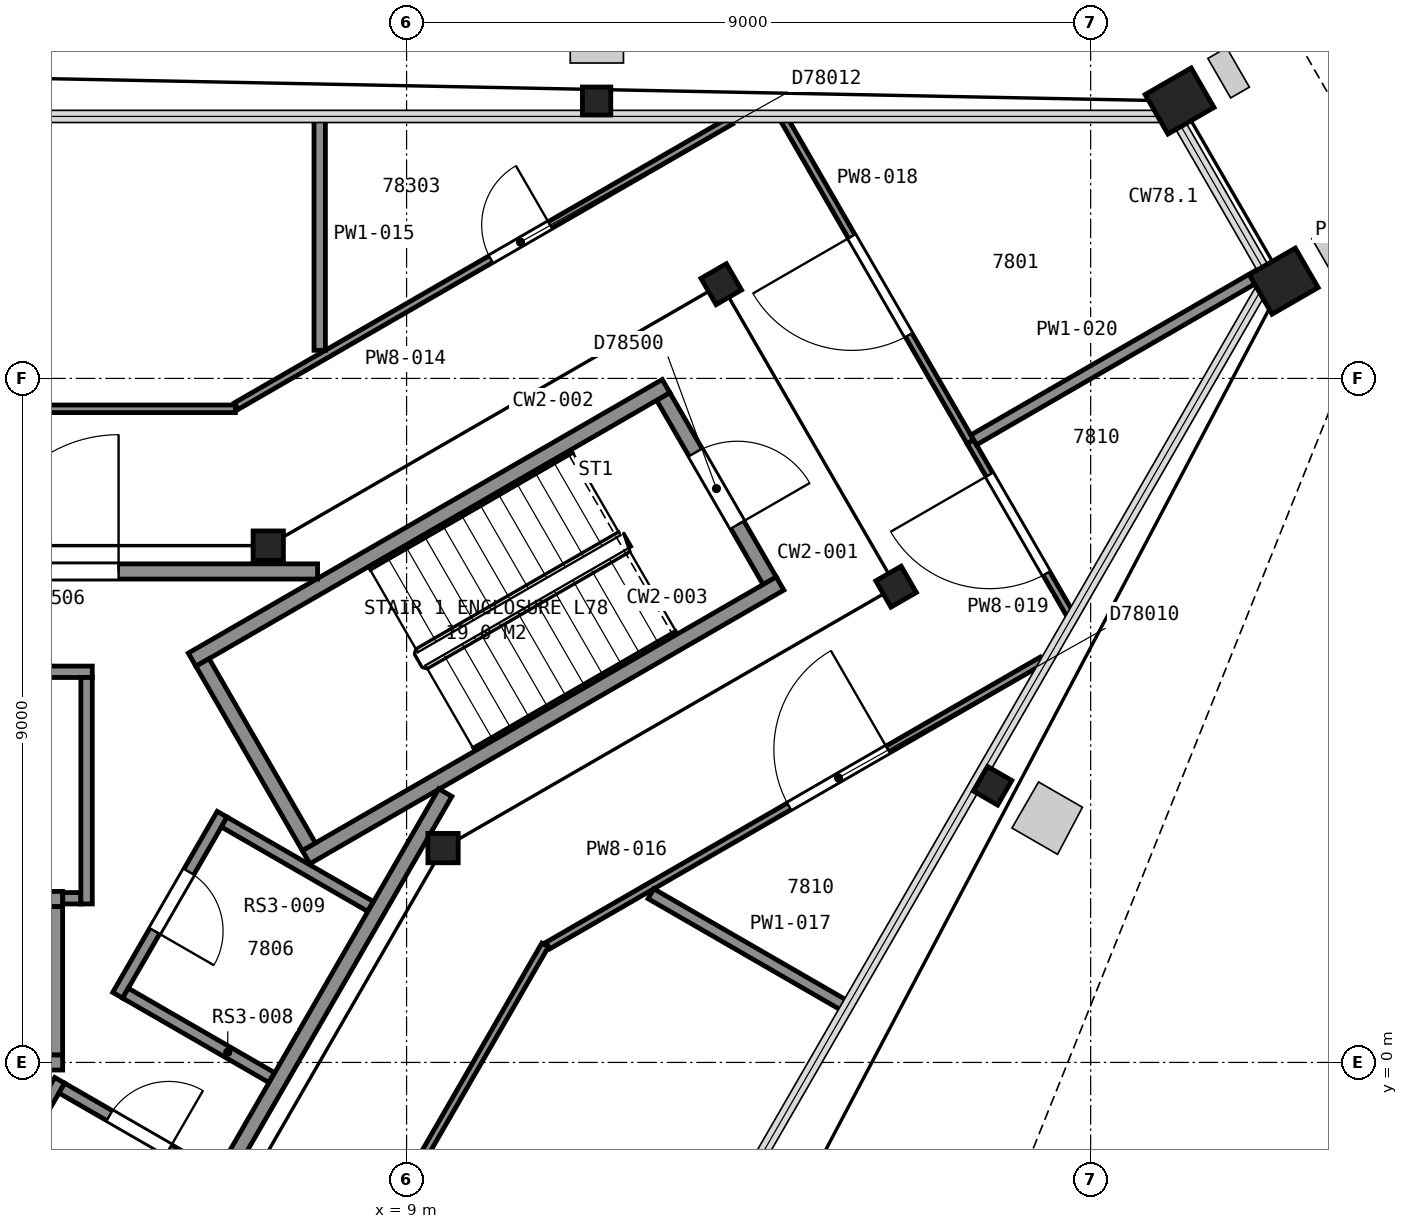
"""IFC4 building model, lengths in metres.
Left out: names, types, materials, properties, quantities, classifications, styles, units other than length and angle.
Written with IfcOpenShell. Run it as: python <this file> out.ifc"""

import sys

from ifc_helpers import new_model, si_unit, direction, frame, frame_2d, origin, origin_2d, place, context, subcontext, project, spatial, rectangle, hollow_rectangle, i_section, extrude, element, fill, save


model = new_model("IFC4")
c1 = context("Model", 3, precision=1e-05, world=origin(), true_north=direction((0.0, 1.0)))
c2 = subcontext(c1, "Body", "Model", "MODEL_VIEW")
j1 = project(units=[si_unit("LENGTHUNIT", "METRE"), si_unit("PLANEANGLEUNIT", "RADIAN")], contexts=[c1])
p1 = place(None, origin())
s1 = spatial("IfcSite", under=j1, at=p1, CompositionType="ELEMENT")
p2 = place(p1, origin())
s2 = spatial("IfcBuilding", under=s1, at=p2, CompositionType="ELEMENT")
p3 = place(p2, frame((0.0, 0.0, 308.4)))
s3 = spatial("IfcBuildingStorey", under=s2, at=p3, CompositionType="ELEMENT", Elevation=308.4)
p4 = place(p3, frame((19.17, 12.65, 0.09), z_axis=(0.0, 0.0, 1.0), x_axis=(0.5, -0.866025403784, 0.0)))
e1 = element("IfcColumn", 1, at=p4, inside=s3, PredefinedType="COLUMN", context=c2, shape_type="SweptSolid", body=[
    extrude(hollow_rectangle(XDim=0.6, YDim=0.7, WallThickness=0.04, at=origin_2d()), origin(), (0.0, 0.0, 1.0), 4.11),
])
for number, where, z_axis, x_axis in (
    (2, (11.5, 12.65, 0.055), (0.0, 0.0, 1.0), (1.0, 0.0, 0.0)),
    (3, (16.71, 3.64, 0.055), (0.0, 0.0, 1.0), (-0.5, -0.866, 0.0)),
):
    element("IfcColumn", number, at=place(p3, frame(where, z_axis=z_axis, x_axis=x_axis)), inside=s3, PredefinedType="COLUMN", context=c2, shape_type="SweptSolid", body=[
        extrude(i_section(OverallWidth=0.373, OverallDepth=0.368, WebThickness=0.015, FlangeThickness=0.024, FilletRadius=0.015, at=origin_2d()), origin(), (0.0, 0.0, 1.0), 4.145),
    ])
p5 = place(p3, frame((20.54, 10.28, 0.09), z_axis=(0.0, 0.0, 1.0), x_axis=(0.5, -0.866025403784, 0.0)))
e4 = element("IfcColumn", 4, at=p5, inside=s3, PredefinedType="COLUMN", context=c2, shape_type="SweptSolid", body=[
    extrude(hollow_rectangle(XDim=0.6, YDim=0.7, WallThickness=0.04, at=origin_2d()), origin(), (0.0, 0.0, 1.0), 4.11),
])
for number, where, z_axis, x_axis in (
    (5, (9.48, 2.82, 0.0), (0.0, 0.0, 1.0), (1.0, 0.0, 0.0)),
    (6, (15.44, 6.26, 0.0), (0.0, 0.0, 1.0), (0.5, -0.866, 0.0)),
    (7, (13.14, 10.24, 0.0), (0.0, 0.0, 1.0), (0.5, -0.866, 0.0)),
    (8, (7.18, 6.8, 0.0), (0.0, 0.0, 1.0), (1.0, 0.0, 0.0)),
):
    element("IfcColumn", number, at=place(p3, frame(where, z_axis=z_axis, x_axis=x_axis)), inside=s3, PredefinedType="COLUMN", context=c2, shape_type="SweptSolid", body=[
        extrude(i_section(OverallWidth=0.399, OverallDepth=0.386, WebThickness=0.021, FlangeThickness=0.033, FilletRadius=0.015, at=origin_2d()), origin(), (0.0, 0.0, 1.0), 4.2),
    ])
p6 = place(p3, frame((13.777, 6.338, 0.0), z_axis=(0.0, 0.0, 1.0), x_axis=(-0.500049511043, 0.865996816683, 0.0)))
e9 = element("IfcWall", 9, at=p6, inside=s3, PredefinedType="PARTITIONING", context=c2, shape_type="SweptSolid", body=[
    extrude(rectangle(XDim=2.8, YDim=0.2, at=frame_2d((1.4, 0.0))), origin(), (0.0, 0.0, 1.0), 3.95),
])
p7 = place(p6, frame((0.85, 0.0, 0.0)))
e10 = element("IfcOpeningElement", 10, at=p7, cuts=e9, PredefinedType="OPENING", context=c2, shape_type="SweptSolid", body=[
    extrude(rectangle(XDim=1.1, YDim=2.1, at=frame_2d((0.55, 1.05))), frame((0.0, 0.11, 0.0), z_axis=(0.0, -1.0, 0.0), x_axis=(1.0, 0.0, 0.0)), (0.0, 0.0, 1.0), 0.22),
])
for number, where, z_axis, x_axis in (
    (11, (6.178, 5.299, 0.0), (0.0, 0.0, 1.0), (0.866, 0.5, 0.0)),
    (12, (7.678, 2.701, 0.0), (0.0, 0.0, 1.0), (0.866, 0.5, 0.0)),
):
    element("IfcWall", number, at=place(p3, frame(where, z_axis=z_axis, x_axis=x_axis)), inside=s3, PredefinedType="PARTITIONING", context=c2, shape_type="SweptSolid", body=[
        extrude(rectangle(XDim=7.2, YDim=0.2, at=frame_2d((3.6, 0.0))), origin(), (0.0, 0.0, 1.0), 3.95),
    ])
p8 = place(p3, frame((7.715, 2.838, 0.0), z_axis=(0.0, 0.0, 1.0), x_axis=(-0.500049511043, 0.865996816683, 0.0)))
e13 = element("IfcWall", 13, at=p8, inside=s3, PredefinedType="PARTITIONING", context=c2, shape_type="SweptSolid", body=[
    extrude(rectangle(XDim=2.8, YDim=0.2, at=frame_2d((1.4, 0.0))), origin(), (0.0, 0.0, 1.0), 3.95),
])
p9 = place(p3, frame((1.525, 0.0, 0.0), z_axis=(0.0, 0.0, 1.0), x_axis=(1.0, 0.0, 0.0)))
e14 = element("IfcWall", 14, at=p9, inside=s3, PredefinedType="PARTITIONING", context=c2, shape_type="SweptSolid", body=[
    extrude(rectangle(XDim=2.95, YDim=0.2, at=frame_2d((1.475, 0.0))), origin(), (0.0, 0.0, 1.0), 4.2),
])
p10 = place(p3, frame((1.525, 2.15, 0.0), z_axis=(0.0, 0.0, 1.0), x_axis=(1.0, 0.0, 0.0)))
e15 = element("IfcWall", 15, at=p10, inside=s3, PredefinedType="PARTITIONING", context=c2, shape_type="SweptSolid", body=[
    extrude(rectangle(XDim=2.95, YDim=0.2, at=frame_2d((1.475, 0.0))), origin(), (0.0, 0.0, 1.0), 4.2),
])
p11 = place(p10, frame((0.925, 0.0, 0.0)))
e16 = element("IfcOpeningElement", 16, at=p11, cuts=e15, PredefinedType="OPENING", context=c2, shape_type="SweptSolid", body=[
    extrude(rectangle(XDim=1.1, YDim=2.1, at=frame_2d((0.55, 1.05))), frame((0.0, 0.11, 0.0), z_axis=(0.0, -1.0, 0.0), x_axis=(1.0, 0.0, 0.0)), (0.0, 0.0, 1.0), 0.22),
])
p12 = place(p3, frame((4.375, 0.1, 0.0), z_axis=(0.0, 0.0, 1.0), x_axis=(0.0, 1.0, 0.0)))
e17 = element("IfcWall", 17, at=p12, inside=s3, PredefinedType="PARTITIONING", context=c2, shape_type="SweptSolid", body=[
    extrude(rectangle(XDim=1.95, YDim=0.2, at=frame_2d((0.975, 0.0))), origin(), (0.0, 0.0, 1.0), 4.2),
])
p13 = place(p3, frame((7.829, 6.46, 0.0), z_axis=(0.0, 0.0, 1.0), x_axis=(-1.0, 0.0, 0.0)))
e18 = element("IfcWall", 18, at=p13, inside=s3, PredefinedType="PARTITIONING", context=c2, shape_type="SweptSolid", body=[
    extrude(rectangle(XDim=15.658, YDim=0.2, at=frame_2d((7.829, 0.0))), origin(), (0.0, 0.0, 1.0), 3.95),
])
p14 = place(p13, frame((2.618, 0.0, 0.0)))
e19 = element("IfcOpeningElement", 19, at=p14, cuts=e18, PredefinedType="OPENING", context=c2, shape_type="SweptSolid", body=[
    extrude(rectangle(XDim=1.8, YDim=2.1, at=frame_2d((0.9, 1.05))), frame((0.0, 0.11, 0.0), z_axis=(0.0, -1.0, 0.0), x_axis=(1.0, 0.0, 0.0)), (0.0, 0.0, 1.0), 0.22),
])
p15 = place(p3, frame((-0.245, 5.14, 0.0), z_axis=(0.0, 0.0, 1.0), x_axis=(1.0, 0.0, 0.0)))
e20 = element("IfcWall", 20, at=p15, inside=s3, PredefinedType="PARTITIONING", context=c2, shape_type="SweptSolid", body=[
    extrude(rectangle(XDim=5.11, YDim=0.15, at=frame_2d((2.555, 0.0))), origin(), (0.0, 0.0, 1.0), 3.95),
])
p16 = place(p15, frame((1.975, 0.0, 0.0)))
e21 = element("IfcOpeningElement", 21, at=p16, cuts=e20, PredefinedType="OPENING", context=c2, shape_type="SweptSolid", body=[
    extrude(rectangle(XDim=1.0, YDim=2.1, at=frame_2d((0.5, 1.05))), frame((0.0, 0.085, 0.0), z_axis=(0.0, -1.0, 0.0), x_axis=(1.0, 0.0, 0.0)), (0.0, 0.0, 1.0), 0.17),
])
p17 = place(p3, frame((2.161, -4.175, 0.0), z_axis=(0.0, 0.0, 1.0), x_axis=(0.500069275991, 0.865985403578, 0.0)))
e22 = element("IfcWall", 22, at=p17, inside=s3, PredefinedType="PARTITIONING", context=c2, shape_type="SweptSolid", body=[
    extrude(rectangle(XDim=4.55, YDim=0.15, at=frame_2d((2.275, 0.0))), origin(), (0.0, 0.0, 1.0), 3.95),
])
p18 = place(p3, frame((3.828, -6.29, 0.0), z_axis=(0.0, 0.0, 1.0), x_axis=(0.499979739078, 0.866037101117, 0.0)))
e23 = element("IfcWall", 23, at=p18, inside=s3, PredefinedType="PARTITIONING", context=c2, shape_type="SweptSolid", body=[
    extrude(rectangle(XDim=11.363, YDim=0.2, at=frame_2d((5.681, 0.0))), origin(), (0.0, 0.0, 1.0), 3.95),
])
p19 = place(p3, frame((6.474, -1.498, 0.0), z_axis=(0.0, 0.0, 1.0), x_axis=(-0.866112027296, 0.499849933654, 0.0)))
e24 = element("IfcWall", 24, at=p19, inside=s3, PredefinedType="PARTITIONING", context=c2, shape_type="SweptSolid", body=[
    extrude(rectangle(XDim=2.321, YDim=0.15, at=frame_2d((1.161, 0.0))), origin(), (0.0, 0.0, 1.0), 3.95),
])
p20 = place(p19, frame((0.696, 0.0, 0.0)))
e25 = element("IfcOpeningElement", 25, at=p20, cuts=e24, PredefinedType="OPENING", context=c2, shape_type="SweptSolid", body=[
    extrude(rectangle(XDim=0.9, YDim=2.1, at=frame_2d((0.45, 1.05))), frame((0.0, 0.085, 0.0), z_axis=(0.0, -1.0, 0.0), x_axis=(1.0, 0.0, 0.0)), (0.0, 0.0, 1.0), 0.17),
])
p21 = place(p3, frame((4.477, 2.16, 0.0), z_axis=(0.0, 0.0, 1.0), x_axis=(1.0, 0.0, 0.0)))
e26 = element("IfcWall", 26, at=p21, inside=s3, PredefinedType="PARTITIONING", context=c2, shape_type="SweptSolid", body=[
    extrude(rectangle(XDim=0.238, YDim=0.15, at=frame_2d((0.119, 0.0))), origin(), (0.0, 0.0, 1.0), 3.95),
])
p22 = place(p3, frame((4.79, 2.085, 0.0), z_axis=(0.0, 0.0, 1.0), x_axis=(0.0, 1.0, 0.0)))
e27 = element("IfcWall", 27, at=p22, inside=s3, PredefinedType="PARTITIONING", context=c2, shape_type="SweptSolid", body=[
    extrude(rectangle(XDim=2.98, YDim=0.15, at=frame_2d((1.49, 0.0))), origin(), (0.0, 0.0, 1.0), 3.95),
])
p23 = place(p3, frame((6.573, 3.266, 0.0), z_axis=(0.0, 0.0, 1.0), x_axis=(-0.499958106649, -0.866049589571, 0.0)))
e28 = element("IfcWall", 28, at=p23, inside=s3, PredefinedType="PARTITIONING", context=c2, shape_type="SweptSolid", body=[
    extrude(rectangle(XDim=2.75, YDim=0.15, at=frame_2d((1.375, 0.0))), origin(), (0.0, 0.0, 1.0), 3.95),
])
p24 = place(p23, frame((0.875, 0.0, 0.0)))
e29 = element("IfcOpeningElement", 29, at=p24, cuts=e28, PredefinedType="OPENING", context=c2, shape_type="SweptSolid", body=[
    extrude(rectangle(XDim=0.9, YDim=2.1, at=frame_2d((0.45, 1.05))), frame((0.0, 0.085, 0.0), z_axis=(0.0, -1.0, 0.0), x_axis=(1.0, 0.0, 0.0)), (0.0, 0.0, 1.0), 0.17),
])
for number, where, z_axis, x_axis in (
    (30, (5.301, 0.912, 0.0), (0.0, 0.0, 1.0), (0.866, -0.5, 0.0)),
    (31, (6.601, 3.164, 0.0), (0.0, 0.0, 1.0), (0.866, -0.5, 0.0)),
):
    element("IfcWall", number, at=place(p3, frame(where, z_axis=z_axis, x_axis=x_axis)), inside=s3, PredefinedType="PARTITIONING", context=c2, shape_type="SweptSolid", body=[
        extrude(rectangle(XDim=2.22, YDim=0.15, at=frame_2d((1.11, 0.0))), origin(), (0.0, 0.0, 1.0), 3.95),
    ])
p25 = place(p3, frame((-6.748, 8.6, 0.0), z_axis=(0.0, 0.0, 1.0), x_axis=(1.0, 0.0, 0.0)))
e32 = element("IfcWall", 32, at=p25, inside=s3, PredefinedType="PARTITIONING", context=c2, shape_type="SweptSolid", body=[
    extrude(rectangle(XDim=13.496, YDim=0.1, at=frame_2d((6.748, 0.0))), origin(), (0.0, 0.0, 1.0), 3.297),
])
p26 = place(p25, frame((6.563, 0.0, 0.0)))
e33 = element("IfcOpeningElement", 33, at=p26, cuts=e32, PredefinedType="OPENING", context=c2, shape_type="SweptSolid", body=[
    extrude(rectangle(XDim=1.5, YDim=2.1, at=frame_2d((0.75, 1.05))), frame((0.0, 0.06, 0.0), z_axis=(0.0, -1.0, 0.0), x_axis=(1.0, 0.0, 0.0)), (0.0, 0.0, 1.0), 0.12),
])
p27 = place(p3, frame((10.823, 1.545, 0.0), z_axis=(0.0, 0.0, 1.0), x_axis=(-0.499912942625, -0.866075660549, 0.0)))
e34 = element("IfcWall", 34, at=p27, inside=s3, PredefinedType="PARTITIONING", context=c2, shape_type="SweptSolid", body=[
    extrude(rectangle(XDim=13.499, YDim=0.1, at=frame_2d((6.749, 0.0))), origin(), (0.0, 0.0, 1.0), 3.297),
])
p28 = place(p27, frame((4.119, 0.0, 0.0)))
e35 = element("IfcOpeningElement", 35, at=p28, cuts=e34, PredefinedType="OPENING", context=c2, shape_type="SweptSolid", body=[
    extrude(rectangle(XDim=1.5, YDim=2.1, at=frame_2d((0.75, 1.05))), frame((0.0, 0.06, 0.0), z_axis=(0.0, -1.0, 0.0), x_axis=(1.0, 0.0, 0.0)), (0.0, 0.0, 1.0), 0.12),
])
p29 = place(p3, frame((6.759, 8.635, 0.0), z_axis=(0.0, 0.0, 1.0), x_axis=(0.866073029218, 0.499917501255, 0.0)))
e36 = element("IfcWall", 36, at=p29, inside=s3, PredefinedType="PARTITIONING", context=c2, shape_type="SweptSolid", body=[
    extrude(rectangle(XDim=7.512, YDim=0.1, at=frame_2d((3.756, 0.0))), origin(), (0.0, 0.0, 1.0), 3.297),
])
p30 = place(p29, frame((3.868, 0.0, 0.0)))
e37 = element("IfcOpeningElement", 37, at=p30, cuts=e36, PredefinedType="OPENING", context=c2, shape_type="SweptSolid", body=[
    extrude(rectangle(XDim=0.9, YDim=2.1, at=frame_2d((0.45, 1.05))), frame((0.0, 0.06, 0.0), z_axis=(0.0, -1.0, 0.0), x_axis=(1.0, 0.0, 0.0)), (0.0, 0.0, 1.0), 0.12),
])
p31 = place(p3, frame((7.857, 9.37, 0.0), z_axis=(0.0, 0.0, 1.0), x_axis=(0.0, 1.0, 0.0)))
e38 = element("IfcWall", 38, at=p31, inside=s3, PredefinedType="PARTITIONING", context=c2, shape_type="SweptSolid", body=[
    extrude(rectangle(XDim=3.063, YDim=0.15, at=frame_2d((1.531, 0.0))), origin(), (0.0, 0.0, 1.0), 3.297),
])
p32 = place(p3, frame((17.361, 5.29, 0.0), z_axis=(0.0, 0.0, 1.0), x_axis=(-0.866105995393, -0.499860385252, 0.0)))
e39 = element("IfcWall", 39, at=p32, inside=s3, PredefinedType="PARTITIONING", context=c2, shape_type="SweptSolid", body=[
    extrude(rectangle(XDim=7.508, YDim=0.1, at=frame_2d((3.754, 0.0))), origin(), (0.0, 0.0, 1.0), 3.297),
])
p33 = place(p32, frame((2.343, 0.0, 0.0)))
e40 = element("IfcOpeningElement", 40, at=p33, cuts=e39, PredefinedType="OPENING", context=c2, shape_type="SweptSolid", body=[
    extrude(rectangle(XDim=1.5, YDim=2.1, at=frame_2d((0.75, 1.05))), frame((0.0, 0.06, 0.0), z_axis=(0.0, -1.0, 0.0), x_axis=(1.0, 0.0, 0.0)), (0.0, 0.0, 1.0), 0.12),
])
p34 = place(p3, frame((12.215, 2.219, 0.0), z_axis=(0.0, 0.0, 1.0), x_axis=(0.865983964866, -0.500071767444, 0.0)))
e41 = element("IfcWall", 41, at=p34, inside=s3, PredefinedType="PARTITIONING", context=c2, shape_type="SweptSolid", body=[
    extrude(rectangle(XDim=2.964, YDim=0.15, at=frame_2d((1.482, 0.0))), origin(), (0.0, 0.0, 1.0), 3.297),
])
p35 = place(p3, frame((13.966, 12.408, 0.0), z_axis=(0.0, 0.0, 1.0), x_axis=(0.500399645014, -0.865794545646, 0.0)))
e42 = element("IfcWall", 42, at=p35, inside=s3, PredefinedType="PARTITIONING", context=c2, shape_type="SweptSolid", body=[
    extrude(rectangle(XDim=4.899, YDim=0.1, at=frame_2d((2.449, 0.0))), origin(), (0.0, 0.0, 1.0), 3.297),
])
p36 = place(p35, frame((1.779, 0.0, 0.0)))
e43 = element("IfcOpeningElement", 43, at=p36, cuts=e42, PredefinedType="OPENING", context=c2, shape_type="SweptSolid", body=[
    extrude(rectangle(XDim=1.5, YDim=2.1, at=frame_2d((0.75, 1.05))), frame((0.0, 0.06, 0.0), z_axis=(0.0, -1.0, 0.0), x_axis=(1.0, 0.0, 0.0)), (0.0, 0.0, 1.0), 0.12),
])
p37 = place(p3, frame((16.418, 8.166, 0.0), z_axis=(0.0, 0.0, 1.0), x_axis=(0.500141194934, -0.865943869503, 0.0)))
e44 = element("IfcWall", 44, at=p37, inside=s3, PredefinedType="PARTITIONING", context=c2, shape_type="SweptSolid", body=[
    extrude(rectangle(XDim=2.624, YDim=0.1, at=frame_2d((1.312, 0.0))), origin(), (0.0, 0.0, 1.0), 3.297),
])
p38 = place(p37, frame((0.5, 0.0, 0.0)))
e45 = element("IfcOpeningElement", 45, at=p38, cuts=e44, PredefinedType="OPENING", context=c2, shape_type="SweptSolid", body=[
    extrude(rectangle(XDim=1.5, YDim=2.1, at=frame_2d((0.75, 1.05))), frame((0.0, 0.06, 0.0), z_axis=(0.0, -1.0, 0.0), x_axis=(1.0, 0.0, 0.0)), (0.0, 0.0, 1.0), 0.12),
])
p39 = place(p3, frame((16.461, 8.191, 0.0), z_axis=(0.0, 0.0, 1.0), x_axis=(0.865849090599, 0.500305259125, 0.0)))
e46 = element("IfcWall", 46, at=p39, inside=s3, PredefinedType="PARTITIONING", context=c2, shape_type="SweptSolid", body=[
    extrude(rectangle(XDim=4.411, YDim=0.15, at=frame_2d((2.206, 0.0))), origin(), (0.0, 0.0, 1.0), 3.297),
])
p40 = place(p7, origin())
e47 = element("IfcDoor", 47, at=p40, inside=s3, OperationType="SINGLE_SWING_LEFT", PredefinedType="DOOR", context=c2, shape_type="SweptSolid", body=[
    extrude(rectangle(XDim=1.1, YDim=2.1, at=frame_2d((0.55, 1.05))), frame((0.0, 0.025, 0.0), z_axis=(0.0, -1.0, 0.0), x_axis=(1.0, 0.0, 0.0)), (0.0, 0.0, 1.0), 0.05),
])
fill(e10, e47)
p41 = place(p14, origin())
e48 = element("IfcDoor", 48, at=p41, inside=s3, OperationType="DOUBLE_DOOR_SINGLE_SWING", PredefinedType="DOOR", context=c2, shape_type="SweptSolid", body=[
    extrude(rectangle(XDim=1.8, YDim=2.1, at=frame_2d((0.9, 1.05))), frame((0.0, 0.025, 0.0), z_axis=(0.0, -1.0, 0.0), x_axis=(1.0, 0.0, 0.0)), (0.0, 0.0, 1.0), 0.05),
])
fill(e19, e48)
p42 = place(p20, origin())
e49 = element("IfcDoor", 49, at=p42, inside=s3, OperationType="SINGLE_SWING_LEFT", PredefinedType="DOOR", context=c2, shape_type="SweptSolid", body=[
    extrude(rectangle(XDim=0.9, YDim=2.1, at=frame_2d((0.45, 1.05))), frame((0.0, 0.025, 0.0), z_axis=(0.0, -1.0, 0.0), x_axis=(1.0, 0.0, 0.0)), (0.0, 0.0, 1.0), 0.05),
])
fill(e25, e49)
p43 = place(p24, origin())
e50 = element("IfcDoor", 50, at=p43, inside=s3, OperationType="SINGLE_SWING_RIGHT", PredefinedType="DOOR", context=c2, shape_type="SweptSolid", body=[
    extrude(rectangle(XDim=0.9, YDim=2.1, at=frame_2d((0.45, 1.05))), frame((0.0, 0.025, 0.0), z_axis=(0.0, -1.0, 0.0), x_axis=(1.0, 0.0, 0.0)), (0.0, 0.0, 1.0), 0.05),
])
fill(e29, e50)
p44 = place(p30, origin())
e51 = element("IfcDoor", 51, at=p44, inside=s3, OperationType="SINGLE_SWING_RIGHT", PredefinedType="DOOR", context=c2, shape_type="SweptSolid", body=[
    extrude(rectangle(XDim=0.9, YDim=2.1, at=frame_2d((0.45, 1.05))), frame((0.0, 0.025, 0.0), z_axis=(0.0, -1.0, 0.0), x_axis=(1.0, 0.0, 0.0)), (0.0, 0.0, 1.0), 0.05),
])
fill(e37, e51)
p45 = place(p33, origin())
e52 = element("IfcDoor", 52, at=p45, inside=s3, OperationType="DOUBLE_DOOR_SINGLE_SWING", PredefinedType="DOOR", context=c2, shape_type="SweptSolid", body=[
    extrude(rectangle(XDim=1.5, YDim=2.1, at=frame_2d((0.75, 1.05))), frame((0.0, 0.025, 0.0), z_axis=(0.0, -1.0, 0.0), x_axis=(1.0, 0.0, 0.0)), (0.0, 0.0, 1.0), 0.05),
])
fill(e40, e52)
p46 = place(p36, origin())
e53 = element("IfcDoor", 53, at=p46, inside=s3, OperationType="DOUBLE_DOOR_SINGLE_SWING", PredefinedType="DOOR", context=c2, shape_type="SweptSolid", body=[
    extrude(rectangle(XDim=1.5, YDim=2.1, at=frame_2d((0.75, 1.05))), frame((0.0, 0.025, 0.0), z_axis=(0.0, -1.0, 0.0), x_axis=(1.0, 0.0, 0.0)), (0.0, 0.0, 1.0), 0.05),
])
fill(e43, e53)
p47 = place(p38, origin())
e54 = element("IfcDoor", 54, at=p47, inside=s3, OperationType="DOUBLE_DOOR_SINGLE_SWING", PredefinedType="DOOR", context=c2, shape_type="SweptSolid", body=[
    extrude(rectangle(XDim=1.5, YDim=2.1, at=frame_2d((0.75, 1.05))), frame((0.0, 0.025, 0.0), z_axis=(0.0, -1.0, 0.0), x_axis=(1.0, 0.0, 0.0)), (0.0, 0.0, 1.0), 0.05),
])
fill(e45, e54)
save(model, sys.argv[1])
